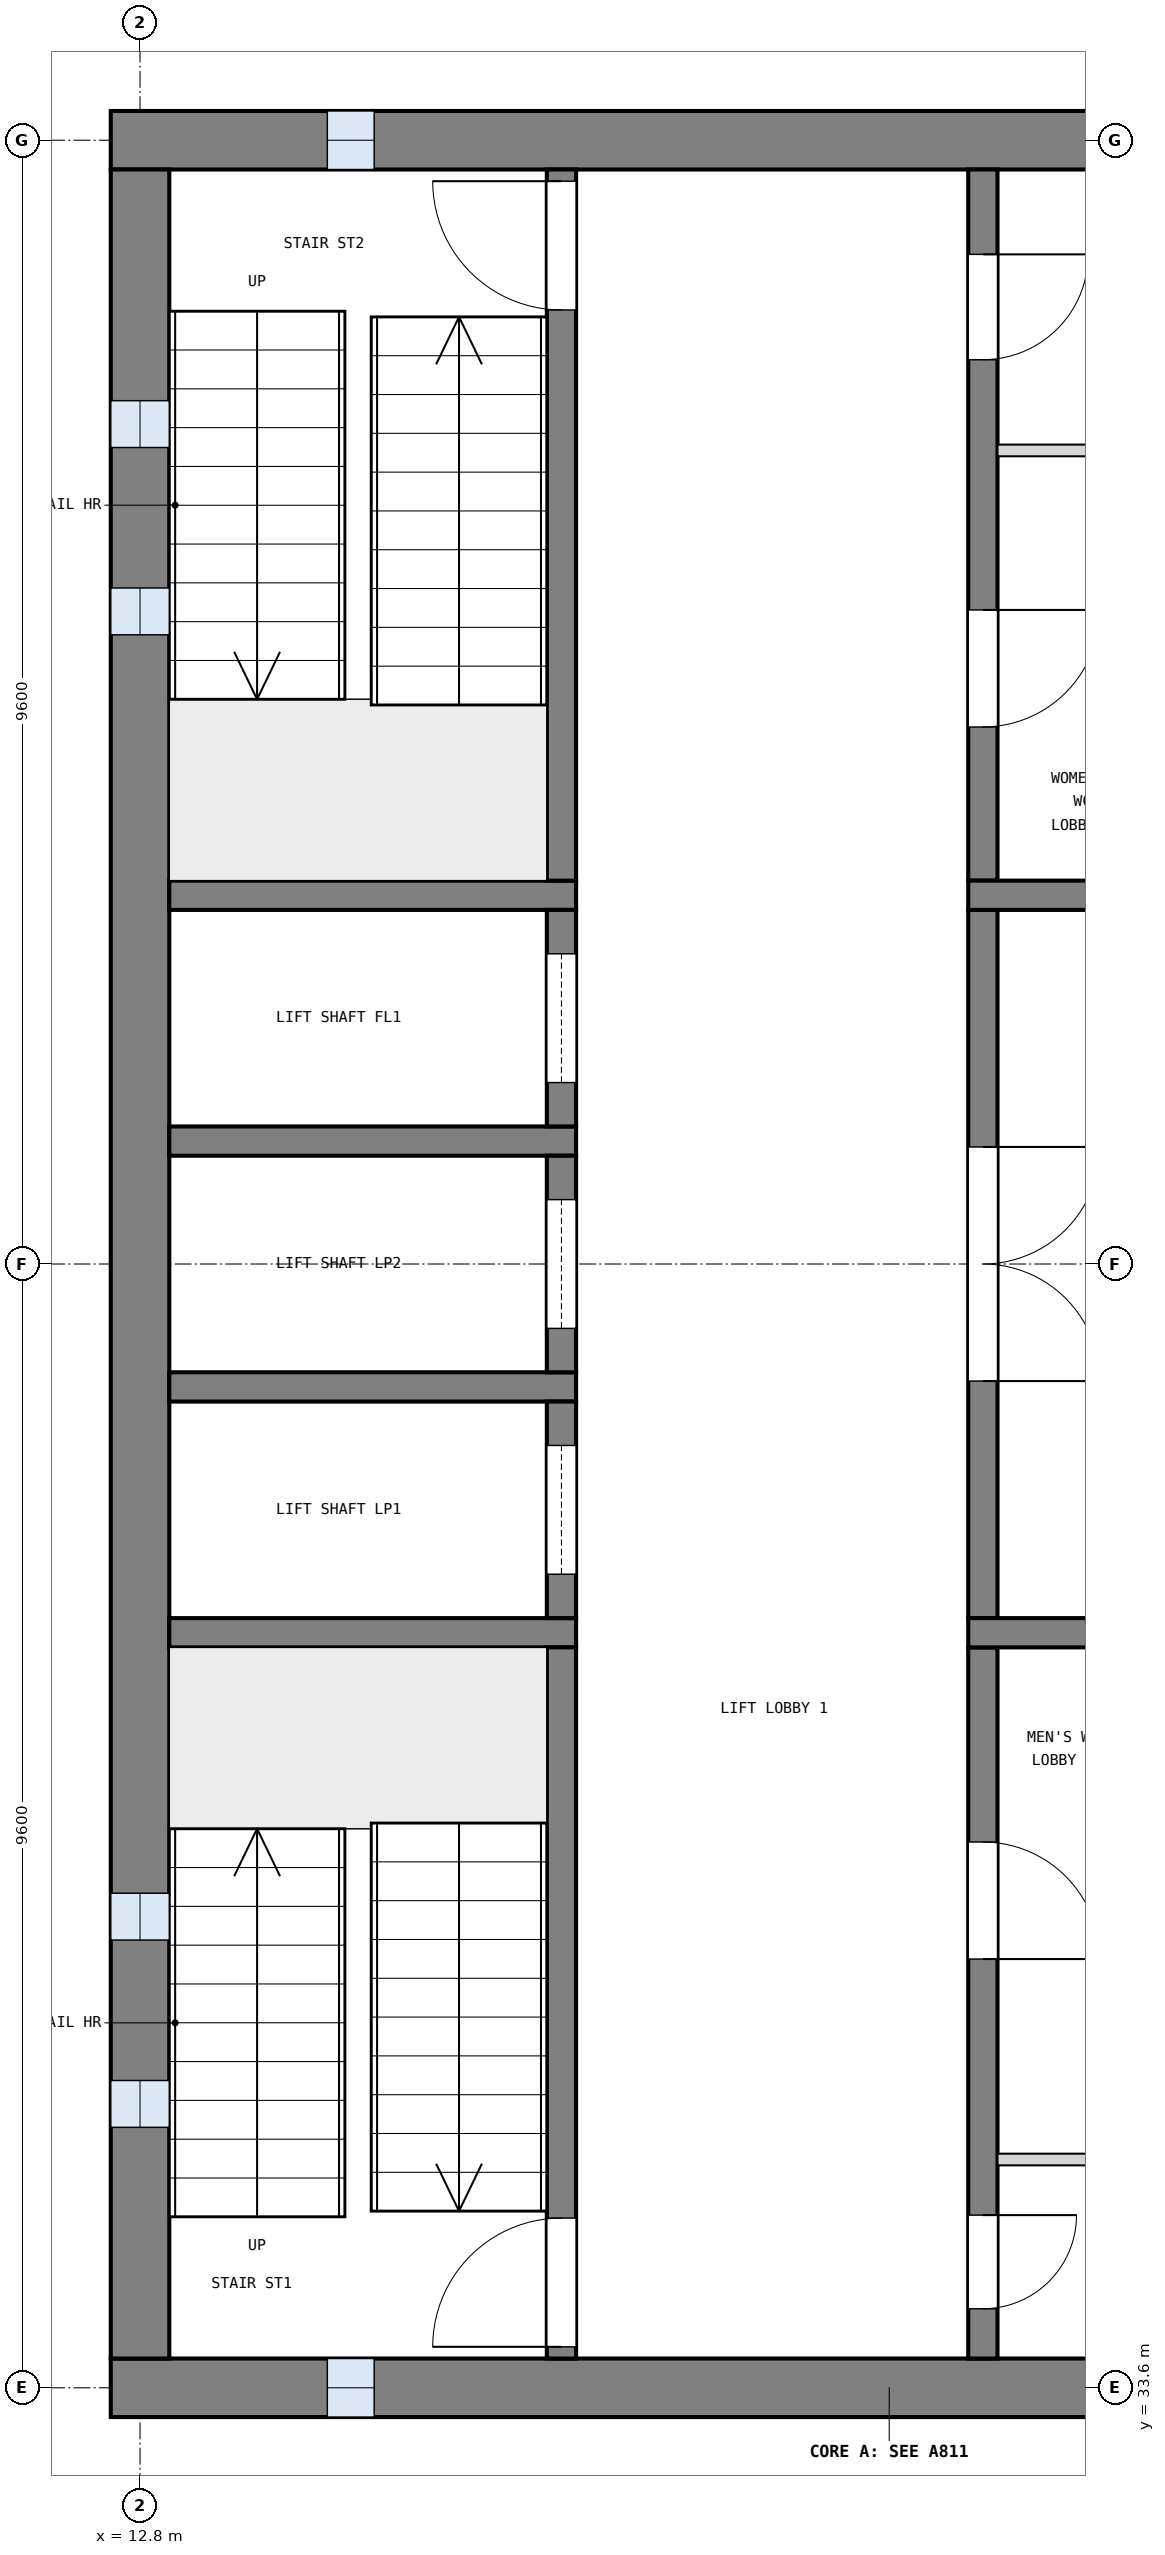
"""IFC4 building model, lengths in metres.
Left out: names, types, materials, properties, quantities, classifications, styles, units other than length and angle.
Written with IfcOpenShell. Run it as: python <this file> out.ifc"""

import sys

from ifc_helpers import new_model, si_unit, direction, frame, frame_2d, origin, place, context, subcontext, project, spatial, rectangle, extrude, element, fill, save


model = new_model("IFC4")
c1 = context("Model", 3, precision=1e-05, world=origin(), true_north=direction((0.0, 1.0)))
c2 = subcontext(c1, "Body", "Model", "MODEL_VIEW")
j1 = project(units=[si_unit("LENGTHUNIT", "METRE"), si_unit("PLANEANGLEUNIT", "RADIAN")], contexts=[c1])
p1 = place(None, origin())
s1 = spatial("IfcSite", under=j1, at=p1, CompositionType="ELEMENT")
p2 = place(p1, origin())
s2 = spatial("IfcBuilding", under=s1, at=p2, CompositionType="ELEMENT")
p3 = place(p2, frame((0.0, 0.0, 36.6)))
s3 = spatial("IfcBuildingStorey", under=s2, at=p3, CompositionType="ELEMENT", Elevation=36.6)
p4 = place(p3, frame((12.55, 52.8, 0.0), z_axis=(0.0, 0.0, 1.0), x_axis=(1.0, 0.0, 0.0)))
e1 = element("IfcWall", 1, at=p4, inside=s3, PredefinedType="SHEAR", context=c2, shape_type="SweptSolid", body=[
    extrude(rectangle(XDim=13.3, YDim=0.5, at=frame_2d((6.65, 0.0))), origin(), (0.0, 0.0, 1.0), 3.9),
])
p5 = place(p4, frame((1.85, 0.0, 1.0)))
e2 = element("IfcOpeningElement", 2, at=p5, cuts=e1, PredefinedType="OPENING", context=c2, shape_type="SweptSolid", body=[
    extrude(rectangle(XDim=0.4, YDim=2.0, at=frame_2d((0.2, 1.0))), frame((0.0, 0.26, 0.0), z_axis=(0.0, -1.0, 0.0), x_axis=(1.0, 0.0, 0.0)), (0.0, 0.0, 1.0), 0.52),
])
p6 = place(p3, frame((12.55, 33.6, 0.0), z_axis=(0.0, 0.0, 1.0), x_axis=(1.0, 0.0, 0.0)))
e3 = element("IfcWall", 3, at=p6, inside=s3, PredefinedType="SHEAR", context=c2, shape_type="SweptSolid", body=[
    extrude(rectangle(XDim=13.3, YDim=0.5, at=frame_2d((6.65, 0.0))), origin(), (0.0, 0.0, 1.0), 3.9),
])
p7 = place(p6, frame((1.85, 0.0, 1.0)))
e4 = element("IfcOpeningElement", 4, at=p7, cuts=e3, PredefinedType="OPENING", context=c2, shape_type="SweptSolid", body=[
    extrude(rectangle(XDim=0.4, YDim=2.0, at=frame_2d((0.2, 1.0))), frame((0.0, 0.26, 0.0), z_axis=(0.0, -1.0, 0.0), x_axis=(1.0, 0.0, 0.0)), (0.0, 0.0, 1.0), 0.52),
])
p8 = place(p3, frame((12.8, 33.85, 0.0), z_axis=(0.0, 0.0, 1.0), x_axis=(0.0, 1.0, 0.0)))
e5 = element("IfcWall", 5, at=p8, inside=s3, PredefinedType="SHEAR", context=c2, shape_type="SweptSolid", body=[
    extrude(rectangle(XDim=18.7, YDim=0.5, at=frame_2d((9.35, 0.0))), origin(), (0.0, 0.0, 1.0), 3.9),
])
p9 = place(p8, frame((1.975, 0.0, 1.0)))
e6 = element("IfcOpeningElement", 6, at=p9, cuts=e5, PredefinedType="OPENING", context=c2, shape_type="SweptSolid", body=[
    extrude(rectangle(XDim=0.4, YDim=2.0, at=frame_2d((0.2, 1.0))), frame((0.0, 0.26, 0.0), z_axis=(0.0, -1.0, 0.0), x_axis=(1.0, 0.0, 0.0)), (0.0, 0.0, 1.0), 0.52),
])
p10 = place(p8, frame((3.575, 0.0, 1.0)))
e7 = element("IfcOpeningElement", 7, at=p10, cuts=e5, PredefinedType="OPENING", context=c2, shape_type="SweptSolid", body=[
    extrude(rectangle(XDim=0.4, YDim=2.0, at=frame_2d((0.2, 1.0))), frame((0.0, 0.26, 0.0), z_axis=(0.0, -1.0, 0.0), x_axis=(1.0, 0.0, 0.0)), (0.0, 0.0, 1.0), 0.52),
])
p11 = place(p8, frame((14.725, 0.0, 1.0)))
e8 = element("IfcOpeningElement", 8, at=p11, cuts=e5, PredefinedType="OPENING", context=c2, shape_type="SweptSolid", body=[
    extrude(rectangle(XDim=0.4, YDim=2.0, at=frame_2d((0.2, 1.0))), frame((0.0, 0.26, 0.0), z_axis=(0.0, -1.0, 0.0), x_axis=(1.0, 0.0, 0.0)), (0.0, 0.0, 1.0), 0.52),
])
p12 = place(p8, frame((16.325, 0.0, 1.0)))
e9 = element("IfcOpeningElement", 9, at=p12, cuts=e5, PredefinedType="OPENING", context=c2, shape_type="SweptSolid", body=[
    extrude(rectangle(XDim=0.4, YDim=2.0, at=frame_2d((0.2, 1.0))), frame((0.0, 0.26, 0.0), z_axis=(0.0, -1.0, 0.0), x_axis=(1.0, 0.0, 0.0)), (0.0, 0.0, 1.0), 0.52),
])
for number, where, z_axis, x_axis in (
    (10, (13.05, 40.05, 0.0), (0.0, 0.0, 1.0), (1.0, 0.0, 0.0)),
    (11, (13.05, 42.15, 0.0), (0.0, 0.0, 1.0), (1.0, 0.0, 0.0)),
    (12, (13.05, 44.25, 0.0), (0.0, 0.0, 1.0), (1.0, 0.0, 0.0)),
    (13, (13.05, 46.35, 0.0), (0.0, 0.0, 1.0), (1.0, 0.0, 0.0)),
):
    element("IfcWall", number, at=place(p3, frame(where, z_axis=z_axis, x_axis=x_axis)), inside=s3, PredefinedType="SOLIDWALL", context=c2, shape_type="SweptSolid", body=[
        extrude(rectangle(XDim=3.475, YDim=0.25, at=frame_2d((1.737, 0.0))), origin(), (0.0, 0.0, 1.0), 3.6),
    ])
p13 = place(p3, frame((16.4, 33.85, 0.0), z_axis=(0.0, 0.0, 1.0), x_axis=(0.0, 1.0, 0.0)))
e14 = element("IfcWall", 14, at=p13, inside=s3, PredefinedType="SOLIDWALL", context=c2, shape_type="SweptSolid", body=[
    extrude(rectangle(XDim=6.075, YDim=0.25, at=frame_2d((3.038, 0.0))), origin(), (0.0, 0.0, 1.0), 3.6),
])
p14 = place(p13, frame((0.1, 0.0, 0.0)))
e15 = element("IfcOpeningElement", 15, at=p14, cuts=e14, PredefinedType="OPENING", context=c2, shape_type="SweptSolid", body=[
    extrude(rectangle(XDim=1.1, YDim=2.1, at=frame_2d((0.55, 1.05))), frame((0.0, 0.135, 0.0), z_axis=(0.0, -1.0, 0.0), x_axis=(1.0, 0.0, 0.0)), (0.0, 0.0, 1.0), 0.27),
])
p15 = place(p3, frame((16.4, 40.175, 0.0), z_axis=(0.0, 0.0, 1.0), x_axis=(0.0, 1.0, 0.0)))
e16 = element("IfcWall", 16, at=p15, inside=s3, PredefinedType="SOLIDWALL", context=c2, shape_type="SweptSolid", body=[
    extrude(rectangle(XDim=1.85, YDim=0.25, at=frame_2d((0.925, 0.0))), origin(), (0.0, 0.0, 1.0), 3.6),
])
p16 = place(p15, frame((0.375, 0.0, 0.0)))
e17 = element("IfcOpeningElement", 17, at=p16, cuts=e16, PredefinedType="OPENING", context=c2, shape_type="SweptSolid", body=[
    extrude(rectangle(XDim=1.1, YDim=2.1, at=frame_2d((0.55, 1.05))), frame((0.0, 0.135, 0.0), z_axis=(0.0, -1.0, 0.0), x_axis=(1.0, 0.0, 0.0)), (0.0, 0.0, 1.0), 0.27),
])
p17 = place(p3, frame((16.4, 42.275, 0.0), z_axis=(0.0, 0.0, 1.0), x_axis=(0.0, 1.0, 0.0)))
e18 = element("IfcWall", 18, at=p17, inside=s3, PredefinedType="SOLIDWALL", context=c2, shape_type="SweptSolid", body=[
    extrude(rectangle(XDim=1.85, YDim=0.25, at=frame_2d((0.925, 0.0))), origin(), (0.0, 0.0, 1.0), 3.6),
])
p18 = place(p17, frame((0.375, 0.0, 0.0)))
e19 = element("IfcOpeningElement", 19, at=p18, cuts=e18, PredefinedType="OPENING", context=c2, shape_type="SweptSolid", body=[
    extrude(rectangle(XDim=1.1, YDim=2.1, at=frame_2d((0.55, 1.05))), frame((0.0, 0.135, 0.0), z_axis=(0.0, -1.0, 0.0), x_axis=(1.0, 0.0, 0.0)), (0.0, 0.0, 1.0), 0.27),
])
p19 = place(p3, frame((16.4, 44.375, 0.0), z_axis=(0.0, 0.0, 1.0), x_axis=(0.0, 1.0, 0.0)))
e20 = element("IfcWall", 20, at=p19, inside=s3, PredefinedType="SOLIDWALL", context=c2, shape_type="SweptSolid", body=[
    extrude(rectangle(XDim=1.85, YDim=0.25, at=frame_2d((0.925, 0.0))), origin(), (0.0, 0.0, 1.0), 3.6),
])
p20 = place(p19, frame((0.375, 0.0, 0.0)))
e21 = element("IfcOpeningElement", 21, at=p20, cuts=e20, PredefinedType="OPENING", context=c2, shape_type="SweptSolid", body=[
    extrude(rectangle(XDim=1.1, YDim=2.1, at=frame_2d((0.55, 1.05))), frame((0.0, 0.135, 0.0), z_axis=(0.0, -1.0, 0.0), x_axis=(1.0, 0.0, 0.0)), (0.0, 0.0, 1.0), 0.27),
])
p21 = place(p3, frame((16.4, 46.475, 0.0), z_axis=(0.0, 0.0, 1.0), x_axis=(0.0, 1.0, 0.0)))
e22 = element("IfcWall", 22, at=p21, inside=s3, PredefinedType="SOLIDWALL", context=c2, shape_type="SweptSolid", body=[
    extrude(rectangle(XDim=6.075, YDim=0.25, at=frame_2d((3.038, 0.0))), origin(), (0.0, 0.0, 1.0), 3.6),
])
p22 = place(p21, frame((4.875, 0.0, 0.0)))
e23 = element("IfcOpeningElement", 23, at=p22, cuts=e22, PredefinedType="OPENING", context=c2, shape_type="SweptSolid", body=[
    extrude(rectangle(XDim=1.1, YDim=2.1, at=frame_2d((0.55, 1.05))), frame((0.0, 0.135, 0.0), z_axis=(0.0, -1.0, 0.0), x_axis=(1.0, 0.0, 0.0)), (0.0, 0.0, 1.0), 0.27),
])
p23 = place(p3, frame((20.0, 33.85, 0.0), z_axis=(0.0, 0.0, 1.0), x_axis=(0.0, 1.0, 0.0)))
e24 = element("IfcWall", 24, at=p23, inside=s3, PredefinedType="SOLIDWALL", context=c2, shape_type="SweptSolid", body=[
    extrude(rectangle(XDim=6.075, YDim=0.25, at=frame_2d((3.038, 0.0))), origin(), (0.0, 0.0, 1.0), 3.6),
])
p24 = place(p23, frame((0.425, 0.0, 0.0)))
e25 = element("IfcOpeningElement", 25, at=p24, cuts=e24, PredefinedType="OPENING", context=c2, shape_type="SweptSolid", body=[
    extrude(rectangle(XDim=0.8, YDim=2.1, at=frame_2d((0.4, 1.05))), frame((0.0, 0.135, 0.0), z_axis=(0.0, -1.0, 0.0), x_axis=(1.0, 0.0, 0.0)), (0.0, 0.0, 1.0), 0.27),
])
p25 = place(p23, frame((3.413, 0.0, 0.0)))
e26 = element("IfcOpeningElement", 26, at=p25, cuts=e24, PredefinedType="OPENING", context=c2, shape_type="SweptSolid", body=[
    extrude(rectangle(XDim=1.0, YDim=2.1, at=frame_2d((0.5, 1.05))), frame((0.0, 0.135, 0.0), z_axis=(0.0, -1.0, 0.0), x_axis=(1.0, 0.0, 0.0)), (0.0, 0.0, 1.0), 0.27),
])
p26 = place(p3, frame((20.0, 40.175, 0.0), z_axis=(0.0, 0.0, 1.0), x_axis=(0.0, 1.0, 0.0)))
e27 = element("IfcWall", 27, at=p26, inside=s3, PredefinedType="SOLIDWALL", context=c2, shape_type="SweptSolid", body=[
    extrude(rectangle(XDim=6.05, YDim=0.25, at=frame_2d((3.025, 0.0))), origin(), (0.0, 0.0, 1.0), 3.6),
])
p27 = place(p26, frame((2.025, 0.0, 0.0)))
e28 = element("IfcOpeningElement", 28, at=p27, cuts=e27, PredefinedType="OPENING", context=c2, shape_type="SweptSolid", body=[
    extrude(rectangle(XDim=2.0, YDim=2.1, at=frame_2d((1.0, 1.05))), frame((0.0, 0.135, 0.0), z_axis=(0.0, -1.0, 0.0), x_axis=(1.0, 0.0, 0.0)), (0.0, 0.0, 1.0), 0.27),
])
p28 = place(p3, frame((20.0, 46.475, 0.0), z_axis=(0.0, 0.0, 1.0), x_axis=(0.0, 1.0, 0.0)))
e29 = element("IfcWall", 29, at=p28, inside=s3, PredefinedType="SOLIDWALL", context=c2, shape_type="SweptSolid", body=[
    extrude(rectangle(XDim=6.075, YDim=0.25, at=frame_2d((3.038, 0.0))), origin(), (0.0, 0.0, 1.0), 3.6),
])
p29 = place(p28, frame((1.312, 0.0, 0.0)))
e30 = element("IfcOpeningElement", 30, at=p29, cuts=e29, PredefinedType="OPENING", context=c2, shape_type="SweptSolid", body=[
    extrude(rectangle(XDim=1.0, YDim=2.1, at=frame_2d((0.5, 1.05))), frame((0.0, 0.135, 0.0), z_axis=(0.0, -1.0, 0.0), x_axis=(1.0, 0.0, 0.0)), (0.0, 0.0, 1.0), 0.27),
])
p30 = place(p28, frame((4.45, 0.0, 0.0)))
e31 = element("IfcOpeningElement", 31, at=p30, cuts=e29, PredefinedType="OPENING", context=c2, shape_type="SweptSolid", body=[
    extrude(rectangle(XDim=0.9, YDim=2.1, at=frame_2d((0.45, 1.05))), frame((0.0, 0.135, 0.0), z_axis=(0.0, -1.0, 0.0), x_axis=(1.0, 0.0, 0.0)), (0.0, 0.0, 1.0), 0.27),
])
for number, where, z_axis, x_axis in (
    (32, (19.875, 40.05, 0.0), (0.0, 0.0, 1.0), (1.0, 0.0, 0.0)),
    (33, (19.875, 46.35, 0.0), (0.0, 0.0, 1.0), (1.0, 0.0, 0.0)),
):
    element("IfcWall", number, at=place(p3, frame(where, z_axis=z_axis, x_axis=x_axis)), inside=s3, PredefinedType="SOLIDWALL", context=c2, shape_type="SweptSolid", body=[
        extrude(rectangle(XDim=5.475, YDim=0.25, at=frame_2d((2.738, 0.0))), origin(), (0.0, 0.0, 1.0), 3.6),
    ])
for number, where, z_axis, x_axis in (
    (34, (20.125, 35.55, 0.0), (0.0, 0.0, 1.0), (1.0, 0.0, 0.0)),
    (35, (20.125, 50.15, 0.0), (0.0, 0.0, 1.0), (1.0, 0.0, 0.0)),
):
    element("IfcWall", number, at=place(p3, frame(where, z_axis=z_axis, x_axis=x_axis)), inside=s3, PredefinedType="PARTITIONING", context=c2, shape_type="SweptSolid", body=[
        extrude(rectangle(XDim=5.225, YDim=0.1, at=frame_2d((2.613, 0.0))), origin(), (0.0, 0.0, 1.0), 3.6),
    ])
p31 = place(p9, origin())
e36 = element("IfcWindow", 36, at=p31, inside=s3, PartitioningType="SINGLE_PANEL", PredefinedType="WINDOW", context=c2, shape_type="SweptSolid", body=[
    extrude(rectangle(XDim=0.4, YDim=2.0, at=frame_2d((0.2, 1.0))), frame((0.0, 0.03, 0.0), z_axis=(0.0, -1.0, 0.0), x_axis=(1.0, 0.0, 0.0)), (0.0, 0.0, 1.0), 0.06),
])
fill(e6, e36)
p32 = place(p10, origin())
e37 = element("IfcWindow", 37, at=p32, inside=s3, PartitioningType="SINGLE_PANEL", PredefinedType="WINDOW", context=c2, shape_type="SweptSolid", body=[
    extrude(rectangle(XDim=0.4, YDim=2.0, at=frame_2d((0.2, 1.0))), frame((0.0, 0.03, 0.0), z_axis=(0.0, -1.0, 0.0), x_axis=(1.0, 0.0, 0.0)), (0.0, 0.0, 1.0), 0.06),
])
fill(e7, e37)
p33 = place(p11, origin())
e38 = element("IfcWindow", 38, at=p33, inside=s3, PartitioningType="SINGLE_PANEL", PredefinedType="WINDOW", context=c2, shape_type="SweptSolid", body=[
    extrude(rectangle(XDim=0.4, YDim=2.0, at=frame_2d((0.2, 1.0))), frame((0.0, 0.03, 0.0), z_axis=(0.0, -1.0, 0.0), x_axis=(1.0, 0.0, 0.0)), (0.0, 0.0, 1.0), 0.06),
])
fill(e8, e38)
p34 = place(p12, origin())
e39 = element("IfcWindow", 39, at=p34, inside=s3, PartitioningType="SINGLE_PANEL", PredefinedType="WINDOW", context=c2, shape_type="SweptSolid", body=[
    extrude(rectangle(XDim=0.4, YDim=2.0, at=frame_2d((0.2, 1.0))), frame((0.0, 0.03, 0.0), z_axis=(0.0, -1.0, 0.0), x_axis=(1.0, 0.0, 0.0)), (0.0, 0.0, 1.0), 0.06),
])
fill(e9, e39)
p35 = place(p7, origin())
e40 = element("IfcWindow", 40, at=p35, inside=s3, PartitioningType="SINGLE_PANEL", PredefinedType="WINDOW", context=c2, shape_type="SweptSolid", body=[
    extrude(rectangle(XDim=0.4, YDim=2.0, at=frame_2d((0.2, 1.0))), frame((0.0, 0.03, 0.0), z_axis=(0.0, -1.0, 0.0), x_axis=(1.0, 0.0, 0.0)), (0.0, 0.0, 1.0), 0.06),
])
fill(e4, e40)
p36 = place(p5, origin())
e41 = element("IfcWindow", 41, at=p36, inside=s3, PartitioningType="SINGLE_PANEL", PredefinedType="WINDOW", context=c2, shape_type="SweptSolid", body=[
    extrude(rectangle(XDim=0.4, YDim=2.0, at=frame_2d((0.2, 1.0))), frame((0.0, 0.03, 0.0), z_axis=(0.0, -1.0, 0.0), x_axis=(1.0, 0.0, 0.0)), (0.0, 0.0, 1.0), 0.06),
])
fill(e2, e41)
p37 = place(p14, origin())
e42 = element("IfcDoor", 42, at=p37, inside=s3, OperationType="SINGLE_SWING_LEFT", PredefinedType="DOOR", context=c2, shape_type="SweptSolid", body=[
    extrude(rectangle(XDim=1.1, YDim=2.1, at=frame_2d((0.55, 1.05))), frame((0.0, 0.025, 0.0), z_axis=(0.0, -1.0, 0.0), x_axis=(1.0, 0.0, 0.0)), (0.0, 0.0, 1.0), 0.05),
])
fill(e15, e42)
p38 = place(p22, origin())
e43 = element("IfcDoor", 43, at=p38, inside=s3, OperationType="SINGLE_SWING_RIGHT", PredefinedType="DOOR", context=c2, shape_type="SweptSolid", body=[
    extrude(rectangle(XDim=1.1, YDim=2.1, at=frame_2d((0.55, 1.05))), frame((0.0, 0.025, 0.0), z_axis=(0.0, -1.0, 0.0), x_axis=(1.0, 0.0, 0.0)), (0.0, 0.0, 1.0), 0.05),
])
fill(e23, e43)
p39 = place(p16, origin())
e44 = element("IfcDoor", 44, at=p39, inside=s3, OperationType="SLIDING_TO_LEFT", PredefinedType="DOOR", context=c2, shape_type="SweptSolid", body=[
    extrude(rectangle(XDim=1.1, YDim=2.1, at=frame_2d((0.55, 1.05))), frame((0.0, 0.025, 0.0), z_axis=(0.0, -1.0, 0.0), x_axis=(1.0, 0.0, 0.0)), (0.0, 0.0, 1.0), 0.05),
])
fill(e17, e44)
p40 = place(p18, origin())
e45 = element("IfcDoor", 45, at=p40, inside=s3, OperationType="SLIDING_TO_LEFT", PredefinedType="DOOR", context=c2, shape_type="SweptSolid", body=[
    extrude(rectangle(XDim=1.1, YDim=2.1, at=frame_2d((0.55, 1.05))), frame((0.0, 0.025, 0.0), z_axis=(0.0, -1.0, 0.0), x_axis=(1.0, 0.0, 0.0)), (0.0, 0.0, 1.0), 0.05),
])
fill(e19, e45)
p41 = place(p20, origin())
e46 = element("IfcDoor", 46, at=p41, inside=s3, OperationType="SLIDING_TO_LEFT", PredefinedType="DOOR", context=c2, shape_type="SweptSolid", body=[
    extrude(rectangle(XDim=1.1, YDim=2.1, at=frame_2d((0.55, 1.05))), frame((0.0, 0.025, 0.0), z_axis=(0.0, -1.0, 0.0), x_axis=(1.0, 0.0, 0.0)), (0.0, 0.0, 1.0), 0.05),
])
fill(e21, e46)
p42 = place(p27, frame((2.0, 0.0, 0.0), z_axis=(0.0, 0.0, 1.0), x_axis=(-1.0, 0.0, 0.0)))
e47 = element("IfcDoor", 47, at=p42, inside=s3, OperationType="DOUBLE_DOOR_SINGLE_SWING", PredefinedType="DOOR", context=c2, shape_type="SweptSolid", body=[
    extrude(rectangle(XDim=2.0, YDim=2.1, at=frame_2d((1.0, 1.05))), frame((0.0, 0.025, 0.0), z_axis=(0.0, -1.0, 0.0), x_axis=(1.0, 0.0, 0.0)), (0.0, 0.0, 1.0), 0.05),
])
fill(e28, e47)
p43 = place(p24, frame((0.8, 0.0, 0.0), z_axis=(0.0, 0.0, 1.0), x_axis=(-1.0, 0.0, 0.0)))
e48 = element("IfcDoor", 48, at=p43, inside=s3, OperationType="SINGLE_SWING_LEFT", PredefinedType="DOOR", context=c2, shape_type="SweptSolid", body=[
    extrude(rectangle(XDim=0.8, YDim=2.1, at=frame_2d((0.4, 1.05))), frame((0.0, 0.025, 0.0), z_axis=(0.0, -1.0, 0.0), x_axis=(1.0, 0.0, 0.0)), (0.0, 0.0, 1.0), 0.05),
])
fill(e25, e48)
p44 = place(p25, frame((1.0, 0.0, 0.0), z_axis=(0.0, 0.0, 1.0), x_axis=(-1.0, 0.0, 0.0)))
e49 = element("IfcDoor", 49, at=p44, inside=s3, OperationType="SINGLE_SWING_RIGHT", PredefinedType="DOOR", context=c2, shape_type="SweptSolid", body=[
    extrude(rectangle(XDim=1.0, YDim=2.1, at=frame_2d((0.5, 1.05))), frame((0.0, 0.025, 0.0), z_axis=(0.0, -1.0, 0.0), x_axis=(1.0, 0.0, 0.0)), (0.0, 0.0, 1.0), 0.05),
])
fill(e26, e49)
p45 = place(p29, frame((1.0, 0.0, 0.0), z_axis=(0.0, 0.0, 1.0), x_axis=(-1.0, 0.0, 0.0)))
e50 = element("IfcDoor", 50, at=p45, inside=s3, OperationType="SINGLE_SWING_LEFT", PredefinedType="DOOR", context=c2, shape_type="SweptSolid", body=[
    extrude(rectangle(XDim=1.0, YDim=2.1, at=frame_2d((0.5, 1.05))), frame((0.0, 0.025, 0.0), z_axis=(0.0, -1.0, 0.0), x_axis=(1.0, 0.0, 0.0)), (0.0, 0.0, 1.0), 0.05),
])
fill(e30, e50)
p46 = place(p30, frame((0.9, 0.0, 0.0), z_axis=(0.0, 0.0, 1.0), x_axis=(-1.0, 0.0, 0.0)))
e51 = element("IfcDoor", 51, at=p46, inside=s3, OperationType="SINGLE_SWING_LEFT", PredefinedType="DOOR", context=c2, shape_type="SweptSolid", body=[
    extrude(rectangle(XDim=0.9, YDim=2.1, at=frame_2d((0.45, 1.05))), frame((0.0, 0.025, 0.0), z_axis=(0.0, -1.0, 0.0), x_axis=(1.0, 0.0, 0.0)), (0.0, 0.0, 1.0), 0.05),
])
fill(e31, e51)
save(model, sys.argv[1])
